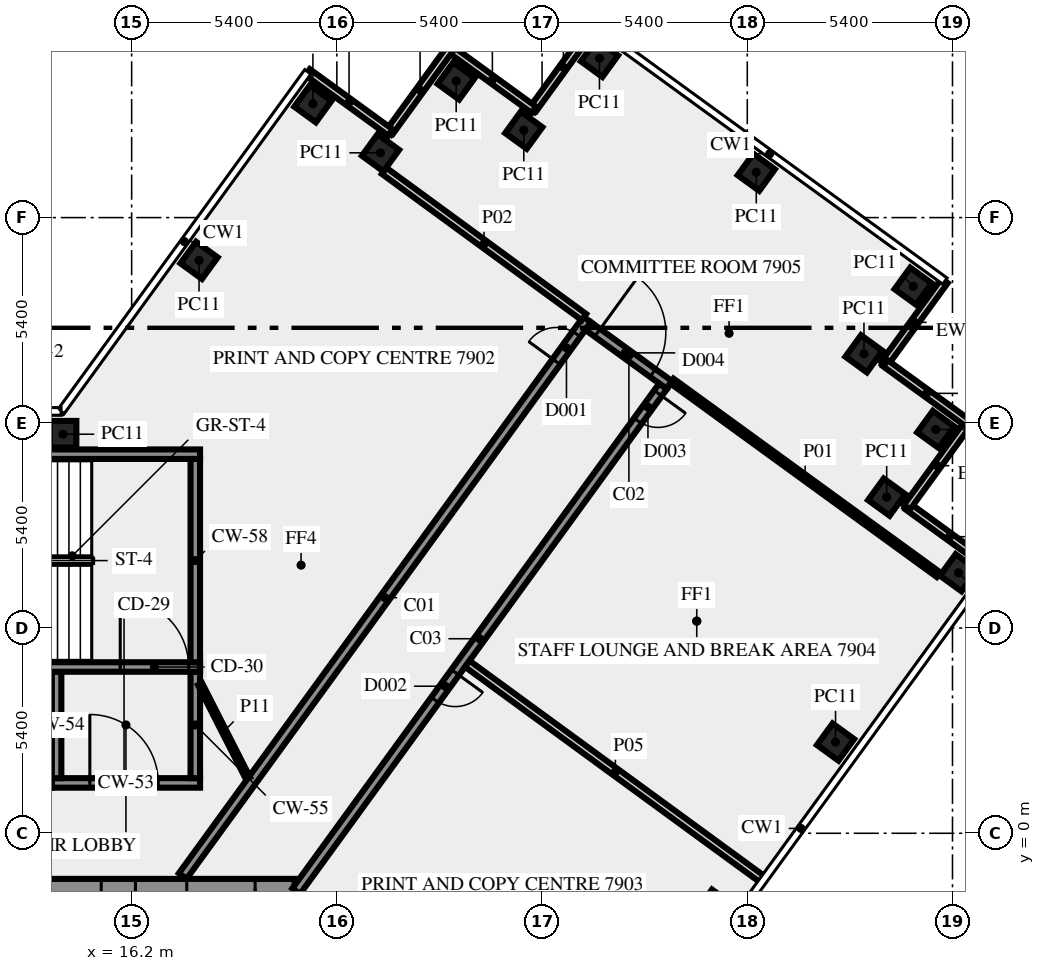
"""IFC4 building model, lengths in metres.
Left out: names, types, materials, properties, quantities, classifications, styles, units other than length and angle.
Written with IfcOpenShell. Run it as: python <this file> out.ifc"""

import sys

from ifc_helpers import new_model, si_unit, direction, frame, frame_2d, origin, origin_2d, place, context, subcontext, project, spatial, rectangle, extrude, element, fill, save


model = new_model("IFC4")
c1 = context("Model", 3, precision=1e-05, world=origin(), true_north=direction((0.0, 1.0)))
c2 = subcontext(c1, "Body", "Model", "MODEL_VIEW")
j1 = project(units=[si_unit("LENGTHUNIT", "METRE"), si_unit("PLANEANGLEUNIT", "RADIAN")], contexts=[c1])
p1 = place(None, origin())
s1 = spatial("IfcSite", under=j1, at=p1, CompositionType="ELEMENT")
p2 = place(p1, origin())
s2 = spatial("IfcBuilding", under=s1, at=p2, CompositionType="ELEMENT")
p3 = place(p2, frame((0.0, 0.0, 339.0)))
s3 = spatial("IfcBuildingStorey", under=s2, at=p3, CompositionType="ELEMENT", Elevation=339.0)
for number, where, z_axis, x_axis in (
    (1, (31.548, -1.969, 0.0), (0.0, 0.0, 1.0), (0.588, 0.809, 0.0)),
    (2, (34.722, 2.4, 0.0), (0.0, 0.0, 1.0), (0.588, 0.809, 0.0)),
    (3, (37.96, 6.855, 0.0), (0.0, 0.0, 1.0), (0.588, 0.809, 0.0)),
    (4, (36.068, 8.844, 0.0), (0.0, 0.0, 1.0), (0.588, 0.809, 0.0)),
    (5, (37.36, 10.625, 0.0), (0.0, 0.0, 1.0), (0.588, 0.809, 0.0)),
    (6, (35.471, 12.616, 0.0), (0.0, 0.0, 1.0), (-0.809, 0.588, 0.0)),
    (7, (36.765, 14.395, 0.0), (0.0, 0.0, 1.0), (-0.809, 0.588, 0.0)),
    (8, (32.637, 17.393, 0.0), (0.0, 0.0, 1.0), (-0.809, 0.588, 0.0)),
    (9, (28.51, 20.39, 0.0), (0.0, 0.0, 1.0), (-0.588, -0.809, 0.0)),
    (10, (26.519, 18.5, 0.0), (0.0, 0.0, 1.0), (-0.809, 0.588, 0.0)),
    (11, (24.74, 19.795, 0.0), (0.0, 0.0, 1.0), (-0.588, -0.809, 0.0)),
    (12, (22.749, 17.904, 0.0), (0.0, 0.0, 1.0), (-0.588, -0.809, 0.0)),
    (13, (20.97, 19.195, 0.0), (0.0, 0.0, 1.0), (-0.588, -0.809, 0.0)),
    (14, (17.974, 15.075, 0.0), (0.0, 0.0, 1.0), (-0.588, -0.809, 0.0)),
    (15, (14.395, 10.5, 0.0), (0.0, 0.0, 1.0), (-1.0, 0.0, 0.0)),
):
    element("IfcColumn", number, at=place(p3, frame(where, z_axis=z_axis, x_axis=x_axis)), inside=s3, PredefinedType="COLUMN", context=c2, shape_type="SweptSolid", body=[
        extrude(rectangle(XDim=0.7, YDim=0.7, at=origin_2d()), origin(), (0.0, 0.0, 1.0), 3.65),
    ])
p4 = place(p3, frame((36.005, 12.352, 0.0), z_axis=(0.0, 0.0, 1.0), x_axis=(0.587762999008, 0.809033161865, 0.0)))
e16 = element("IfcWall", 16, at=p4, inside=s3, PredefinedType="SOLIDWALL", context=c2, shape_type="SweptSolid", body=[
    extrude(rectangle(XDim=2.7, YDim=0.2, at=frame_2d((1.35, 0.0))), origin(), (0.0, 0.0, 1.0), 3.65),
])
for number, where, z_axis, x_axis in (
    (17, (28.354, 21.247, 0.0), (0.0, 0.0, 1.0), (-0.588, -0.809, 0.0)),
    (18, (26.785, 19.036, 0.0), (0.0, 0.0, 1.0), (-0.809, 0.588, 0.0)),
):
    element("IfcWall", number, at=place(p3, frame(where, z_axis=z_axis, x_axis=x_axis)), inside=s3, PredefinedType="SOLIDWALL", context=c2, shape_type="SweptSolid", body=[
        extrude(rectangle(XDim=2.7, YDim=0.2, at=frame_2d((1.35, 0.0))), origin(), (0.0, 0.0, 1.0), 3.65),
    ])
for number, where, z_axis, x_axis in (
    (19, (24.583, 20.65, 0.0), (0.0, 0.0, 1.0), (-0.588, -0.809, 0.0)),
    (20, (23.013, 18.438, 0.0), (0.0, 0.0, 1.0), (-0.809, 0.588, 0.0)),
    (21, (38.814, 7.01, 0.0), (0.0, 0.0, 1.0), (-0.809, 0.588, 0.0)),
    (22, (36.602, 8.58, 0.0), (0.0, 0.0, 1.0), (0.588, 0.809, 0.0)),
    (23, (38.216, 10.782, 0.0), (0.0, 0.0, 1.0), (-0.809, 0.588, 0.0)),
):
    element("IfcWall", number, at=place(p3, frame(where, z_axis=z_axis, x_axis=x_axis)), inside=s3, PredefinedType="SOLIDWALL", context=c2, shape_type="SweptSolid", body=[
        extrude(rectangle(XDim=2.7, YDim=0.2, at=frame_2d((1.35, 0.0))), origin(), (0.0, 0.0, 1.0), 3.65),
    ])
p5 = place(p3, frame((20.49, -1.45, 0.0), z_axis=(0.0, 0.0, 1.0), x_axis=(-1.0, 0.0, 0.0)))
e24 = element("IfcWall", 24, at=p5, inside=s3, PredefinedType="SHEAR", context=c2, shape_type="SweptSolid", body=[
    extrude(rectangle(XDim=40.98, YDim=0.5, at=frame_2d((20.49, 0.0))), origin(), (0.0, 0.0, 1.0), 3.65),
])
p6 = place(p5, frame((38.14, 0.0, 0.0)))
e25 = element("IfcOpeningElement", 25, at=p6, cuts=e24, PredefinedType="OPENING", context=c2, shape_type="SweptSolid", body=[
    extrude(rectangle(XDim=1.8, YDim=2.1, at=frame_2d((0.9, 1.05))), frame((0.0, 0.26, 0.0), z_axis=(0.0, -1.0, 0.0), x_axis=(1.0, 0.0, 0.0)), (0.0, 0.0, 1.0), 0.52),
])
p7 = place(p5, frame((36.728, 0.0, 0.0)))
e26 = element("IfcOpeningElement", 26, at=p7, cuts=e24, PredefinedType="OPENING", context=c2, shape_type="SweptSolid", body=[
    extrude(rectangle(XDim=0.8, YDim=2.1, at=frame_2d((0.4, 1.05))), frame((0.0, 0.26, 0.0), z_axis=(0.0, -1.0, 0.0), x_axis=(1.0, 0.0, 0.0)), (0.0, 0.0, 1.0), 0.52),
])
p8 = place(p5, frame((35.153, 0.0, 0.0)))
e27 = element("IfcOpeningElement", 27, at=p8, cuts=e24, PredefinedType="OPENING", context=c2, shape_type="SweptSolid", body=[
    extrude(rectangle(XDim=0.8, YDim=2.1, at=frame_2d((0.4, 1.05))), frame((0.0, 0.26, 0.0), z_axis=(0.0, -1.0, 0.0), x_axis=(1.0, 0.0, 0.0)), (0.0, 0.0, 1.0), 0.52),
])
p9 = place(p5, frame((32.94, 0.0, 0.0)))
e28 = element("IfcOpeningElement", 28, at=p9, cuts=e24, PredefinedType="OPENING", context=c2, shape_type="SweptSolid", body=[
    extrude(rectangle(XDim=0.9, YDim=2.1, at=frame_2d((0.45, 1.05))), frame((0.0, 0.26, 0.0), z_axis=(0.0, -1.0, 0.0), x_axis=(1.0, 0.0, 0.0)), (0.0, 0.0, 1.0), 0.52),
])
p10 = place(p5, frame((31.015, 0.0, 0.0)))
e29 = element("IfcOpeningElement", 29, at=p10, cuts=e24, PredefinedType="OPENING", context=c2, shape_type="SweptSolid", body=[
    extrude(rectangle(XDim=0.8, YDim=2.1, at=frame_2d((0.4, 1.05))), frame((0.0, 0.26, 0.0), z_axis=(0.0, -1.0, 0.0), x_axis=(1.0, 0.0, 0.0)), (0.0, 0.0, 1.0), 0.52),
])
p11 = place(p5, frame((24.765, 0.0, 0.0)))
e30 = element("IfcOpeningElement", 30, at=p11, cuts=e24, PredefinedType="OPENING", context=c2, shape_type="SweptSolid", body=[
    extrude(rectangle(XDim=0.8, YDim=2.1, at=frame_2d((0.4, 1.05))), frame((0.0, 0.26, 0.0), z_axis=(0.0, -1.0, 0.0), x_axis=(1.0, 0.0, 0.0)), (0.0, 0.0, 1.0), 0.52),
])
p12 = place(p5, frame((19.59, 0.0, 0.0)))
e31 = element("IfcOpeningElement", 31, at=p12, cuts=e24, PredefinedType="OPENING", context=c2, shape_type="SweptSolid", body=[
    extrude(rectangle(XDim=2.0, YDim=2.1, at=frame_2d((1.0, 1.05))), frame((0.0, 0.26, 0.0), z_axis=(0.0, -1.0, 0.0), x_axis=(1.0, 0.0, 0.0)), (0.0, 0.0, 1.0), 0.52),
])
p13 = place(p5, frame((15.103, 0.0, 0.0)))
e32 = element("IfcOpeningElement", 32, at=p13, cuts=e24, PredefinedType="OPENING", context=c2, shape_type="SweptSolid", body=[
    extrude(rectangle(XDim=0.9, YDim=2.1, at=frame_2d((0.45, 1.05))), frame((0.0, 0.26, 0.0), z_axis=(0.0, -1.0, 0.0), x_axis=(1.0, 0.0, 0.0)), (0.0, 0.0, 1.0), 0.52),
])
p14 = place(p5, frame((13.04, 0.0, 0.0)))
e33 = element("IfcOpeningElement", 33, at=p14, cuts=e24, PredefinedType="OPENING", context=c2, shape_type="SweptSolid", body=[
    extrude(rectangle(XDim=0.9, YDim=2.1, at=frame_2d((0.45, 1.05))), frame((0.0, 0.26, 0.0), z_axis=(0.0, -1.0, 0.0), x_axis=(1.0, 0.0, 0.0)), (0.0, 0.0, 1.0), 0.52),
])
p15 = place(p5, frame((10.177, 0.0, 0.0)))
e34 = element("IfcOpeningElement", 34, at=p15, cuts=e24, PredefinedType="OPENING", context=c2, shape_type="SweptSolid", body=[
    extrude(rectangle(XDim=0.9, YDim=2.1, at=frame_2d((0.45, 1.05))), frame((0.0, 0.26, 0.0), z_axis=(0.0, -1.0, 0.0), x_axis=(1.0, 0.0, 0.0)), (0.0, 0.0, 1.0), 0.52),
])
p16 = place(p5, frame((7.14, 0.0, 0.0)))
e35 = element("IfcOpeningElement", 35, at=p16, cuts=e24, PredefinedType="OPENING", context=c2, shape_type="SweptSolid", body=[
    extrude(rectangle(XDim=0.9, YDim=2.1, at=frame_2d((0.45, 1.05))), frame((0.0, 0.26, 0.0), z_axis=(0.0, -1.0, 0.0), x_axis=(1.0, 0.0, 0.0)), (0.0, 0.0, 1.0), 0.52),
])
p17 = place(p5, frame((4.19, 0.0, 0.0)))
e36 = element("IfcOpeningElement", 36, at=p17, cuts=e24, PredefinedType="OPENING", context=c2, shape_type="SweptSolid", body=[
    extrude(rectangle(XDim=0.9, YDim=2.1, at=frame_2d((0.45, 1.05))), frame((0.0, 0.26, 0.0), z_axis=(0.0, -1.0, 0.0), x_axis=(1.0, 0.0, 0.0)), (0.0, 0.0, 1.0), 0.52),
])
p18 = place(p5, frame((1.04, 0.0, 0.0)))
e37 = element("IfcOpeningElement", 37, at=p18, cuts=e24, PredefinedType="OPENING", context=c2, shape_type="SweptSolid", body=[
    extrude(rectangle(XDim=1.8, YDim=2.1, at=frame_2d((0.9, 1.05))), frame((0.0, 0.26, 0.0), z_axis=(0.0, -1.0, 0.0), x_axis=(1.0, 0.0, 0.0)), (0.0, 0.0, 1.0), 0.52),
])
p19 = place(p3, frame((14.1, 1.325, 0.0), z_axis=(0.0, 0.0, 1.0), x_axis=(1.0, 0.0, 0.0)))
e38 = element("IfcWall", 38, at=p19, inside=s3, PredefinedType="SHEAR", context=c2, shape_type="SweptSolid", body=[
    extrude(rectangle(XDim=3.9, YDim=0.25, at=frame_2d((1.95, 0.0))), origin(), (0.0, 0.0, 1.0), 3.65),
])
p20 = place(p19, frame((1.0, 0.0, 0.0)))
e39 = element("IfcOpeningElement", 39, at=p20, cuts=e38, PredefinedType="OPENING", context=c2, shape_type="SweptSolid", body=[
    extrude(rectangle(XDim=1.8, YDim=2.1, at=frame_2d((0.9, 1.05))), frame((0.0, 0.135, 0.0), z_axis=(0.0, -1.0, 0.0), x_axis=(1.0, 0.0, 0.0)), (0.0, 0.0, 1.0), 0.27),
])
for number, where, z_axis, x_axis in (
    (40, (14.225, 1.45, 0.0), (0.0, 0.0, 1.0), (0.0, 1.0, 0.0)),
    (41, (17.875, 1.45, 0.0), (0.0, 0.0, 1.0), (0.0, 1.0, 0.0)),
):
    element("IfcWall", number, at=place(p3, frame(where, z_axis=z_axis, x_axis=x_axis)), inside=s3, PredefinedType="SHEAR", context=c2, shape_type="SweptSolid", body=[
        extrude(rectangle(XDim=2.8, YDim=0.25, at=frame_2d((1.4, 0.0))), origin(), (0.0, 0.0, 1.0), 3.65),
    ])
p21 = place(p3, frame((7.5, 4.375, 0.0), z_axis=(0.0, 0.0, 1.0), x_axis=(1.0, 0.0, 0.0)))
e42 = element("IfcWall", 42, at=p21, inside=s3, PredefinedType="SHEAR", context=c2, shape_type="SweptSolid", body=[
    extrude(rectangle(XDim=10.5, YDim=0.25, at=frame_2d((5.25, 0.0))), origin(), (0.0, 0.0, 1.0), 3.65),
])
p22 = place(p21, frame((8.4, 0.0, 0.0)))
e43 = element("IfcOpeningElement", 43, at=p22, cuts=e42, PredefinedType="OPENING", context=c2, shape_type="SweptSolid", body=[
    extrude(rectangle(XDim=1.8, YDim=2.1, at=frame_2d((0.9, 1.05))), frame((0.0, 0.135, 0.0), z_axis=(0.0, -1.0, 0.0), x_axis=(1.0, 0.0, 0.0)), (0.0, 0.0, 1.0), 0.27),
])
p23 = place(p3, frame((17.875, 4.5, 0.0), z_axis=(0.0, 0.0, 1.0), x_axis=(0.0, 1.0, 0.0)))
e44 = element("IfcWall", 44, at=p23, inside=s3, PredefinedType="SHEAR", context=c2, shape_type="SweptSolid", body=[
    extrude(rectangle(XDim=5.35, YDim=0.25, at=frame_2d((2.675, 0.0))), origin(), (0.0, 0.0, 1.0), 3.65),
])
p24 = place(p3, frame((7.5, 9.975, 0.0), z_axis=(0.0, 0.0, 1.0), x_axis=(1.0, 0.0, 0.0)))
e45 = element("IfcWall", 45, at=p24, inside=s3, PredefinedType="SHEAR", context=c2, shape_type="SweptSolid", body=[
    extrude(rectangle(XDim=10.5, YDim=0.25, at=frame_2d((5.25, 0.0))), origin(), (0.0, 0.0, 1.0), 3.65),
])
p25 = place(p24, frame((2.0, 0.0, 1.0)))
e46 = element("IfcOpeningElement", 46, at=p25, cuts=e45, PredefinedType="OPENING", context=c2, shape_type="SweptSolid", body=[
    extrude(rectangle(XDim=1.2, YDim=1.2, at=frame_2d((0.6, 0.6))), frame((0.0, 0.135, 0.0), z_axis=(0.0, -1.0, 0.0), x_axis=(1.0, 0.0, 0.0)), (0.0, 0.0, 1.0), 0.27),
])
p26 = place(p3, frame((17.545, -1.125, 0.0), z_axis=(0.0, 0.0, 1.0), x_axis=(0.58779555165, 0.809009511354, 0.0)))
e47 = element("IfcWall", 47, at=p26, inside=s3, PredefinedType="SOLIDWALL", context=c2, shape_type="SweptSolid", body=[
    extrude(rectangle(XDim=18.103, YDim=0.25, at=frame_2d((9.052, 0.0))), origin(), (0.0, 0.0, 1.0), 3.65),
])
p27 = place(p26, frame((16.728, 0.0, 0.0)))
e48 = element("IfcOpeningElement", 48, at=p27, cuts=e47, PredefinedType="OPENING", context=c2, shape_type="SweptSolid", body=[
    extrude(rectangle(XDim=0.9, YDim=2.1, at=frame_2d((0.45, 1.05))), frame((0.0, 0.135, 0.0), z_axis=(0.0, -1.0, 0.0), x_axis=(1.0, 0.0, 0.0)), (0.0, 0.0, 1.0), 0.27),
])
p28 = place(p3, frame((28.213, 13.346, 0.0), z_axis=(0.0, 0.0, 1.0), x_axis=(0.809006914995, -0.587799125119, 0.0)))
e49 = element("IfcWall", 49, at=p28, inside=s3, PredefinedType="SOLIDWALL", context=c2, shape_type="SweptSolid", body=[
    extrude(rectangle(XDim=2.65, YDim=0.25, at=frame_2d((1.325, 0.0))), origin(), (0.0, 0.0, 1.0), 3.65),
])
p29 = place(p28, frame((0.3, 0.0, 0.0)))
e50 = element("IfcOpeningElement", 50, at=p29, cuts=e49, PredefinedType="OPENING", context=c2, shape_type="SweptSolid", body=[
    extrude(rectangle(XDim=1.8, YDim=2.1, at=frame_2d((0.9, 1.05))), frame((0.0, 0.135, 0.0), z_axis=(0.0, -1.0, 0.0), x_axis=(1.0, 0.0, 0.0)), (0.0, 0.0, 1.0), 0.27),
])
p30 = place(p3, frame((30.183, 11.761, 0.0), z_axis=(0.0, 0.0, 1.0), x_axis=(-0.587781762867, -0.80901952958, 0.0)))
e51 = element("IfcWall", 51, at=p30, inside=s3, PredefinedType="SOLIDWALL", context=c2, shape_type="SweptSolid", body=[
    extrude(rectangle(XDim=16.42, YDim=0.25, at=frame_2d((8.21, 0.0))), origin(), (0.0, 0.0, 1.0), 3.65),
])
p31 = place(p30, frame((0.225, 0.0, 0.0)))
e52 = element("IfcOpeningElement", 52, at=p31, cuts=e51, PredefinedType="OPENING", context=c2, shape_type="SweptSolid", body=[
    extrude(rectangle(XDim=0.9, YDim=2.1, at=frame_2d((0.45, 1.05))), frame((0.0, 0.135, 0.0), z_axis=(0.0, -1.0, 0.0), x_axis=(1.0, 0.0, 0.0)), (0.0, 0.0, 1.0), 0.27),
])
p32 = place(p30, frame((9.304, 0.0, 0.0)))
e53 = element("IfcOpeningElement", 53, at=p32, cuts=e51, PredefinedType="OPENING", context=c2, shape_type="SweptSolid", body=[
    extrude(rectangle(XDim=0.9, YDim=2.1, at=frame_2d((0.45, 1.05))), frame((0.0, 0.135, 0.0), z_axis=(0.0, -1.0, 0.0), x_axis=(1.0, 0.0, 0.0)), (0.0, 0.0, 1.0), 0.27),
])
p33 = place(p3, frame((30.415, 11.902, 0.0), z_axis=(0.0, 0.0, 1.0), x_axis=(0.809020922653, -0.587779845444, 0.0)))
e54 = element("IfcWall", 54, at=p33, inside=s3, PredefinedType="PARTITIONING", context=c2, shape_type="SweptSolid", body=[
    extrude(rectangle(XDim=8.67, YDim=0.15, at=frame_2d((4.335, 0.0))), origin(), (0.0, 0.0, 1.0), 3.65),
])
p34 = place(p3, frame((22.844, 17.43, 0.0), z_axis=(0.0, 0.0, 1.0), x_axis=(0.80699548015, -0.590557613631, 0.0)))
e55 = element("IfcWall", 55, at=p34, inside=s3, PredefinedType="SOLIDWALL", context=c2, shape_type="SweptSolid", body=[
    extrude(rectangle(XDim=6.515, YDim=0.2, at=frame_2d((3.258, 0.0))), origin(), (0.0, 0.0, 1.0), 3.65),
])
p35 = place(p3, frame((25.032, 4.459, 0.0), z_axis=(0.0, 0.0, 1.0), x_axis=(0.807602415854, -0.589727342004, 0.0)))
e56 = element("IfcWall", 56, at=p35, inside=s3, PredefinedType="SOLIDWALL", context=c2, shape_type="SweptSolid", body=[
    extrude(rectangle(XDim=9.651, YDim=0.2, at=frame_2d((4.826, 0.0))), origin(), (0.0, 0.0, 1.0), 2.95),
])
p36 = place(p3, frame((18.0, 3.925, 0.0), z_axis=(0.0, 0.0, 1.0), x_axis=(0.453950796792, -0.891026752736, 0.0)))
e57 = element("IfcWall", 57, at=p36, inside=s3, PredefinedType="PARTITIONING", context=c2, shape_type="SweptSolid", body=[
    extrude(rectangle(XDim=2.778, YDim=0.12, at=frame_2d((1.389, 0.0))), origin(), (0.0, 0.0, 1.0), 3.65),
])
p37 = place(p17, origin())
e58 = element("IfcDoor", 58, at=p37, inside=s3, OperationType="SINGLE_SWING_LEFT", PredefinedType="DOOR", context=c2, shape_type="SweptSolid", body=[
    extrude(rectangle(XDim=0.9, YDim=2.1, at=frame_2d((0.45, 1.05))), frame((0.0, 0.025, 0.0), z_axis=(0.0, -1.0, 0.0), x_axis=(1.0, 0.0, 0.0)), (0.0, 0.0, 1.0), 0.05),
])
fill(e36, e58)
p38 = place(p18, origin())
e59 = element("IfcDoor", 59, at=p38, inside=s3, OperationType="DOUBLE_DOOR_SINGLE_SWING", PredefinedType="DOOR", context=c2, shape_type="SweptSolid", body=[
    extrude(rectangle(XDim=1.8, YDim=2.1, at=frame_2d((0.9, 1.05))), frame((0.0, 0.025, 0.0), z_axis=(0.0, -1.0, 0.0), x_axis=(1.0, 0.0, 0.0)), (0.0, 0.0, 1.0), 0.05),
])
fill(e37, e59)
p39 = place(p20, origin())
e60 = element("IfcDoor", 60, at=p39, inside=s3, OperationType="DOUBLE_DOOR_SINGLE_SWING", PredefinedType="DOOR", context=c2, shape_type="SweptSolid", body=[
    extrude(rectangle(XDim=1.8, YDim=2.1, at=frame_2d((0.9, 1.05))), frame((0.0, 0.025, 0.0), z_axis=(0.0, -1.0, 0.0), x_axis=(1.0, 0.0, 0.0)), (0.0, 0.0, 1.0), 0.05),
])
fill(e39, e60)
p40 = place(p22, origin())
e61 = element("IfcDoor", 61, at=p40, inside=s3, OperationType="DOUBLE_DOOR_SINGLE_SWING", PredefinedType="DOOR", context=c2, shape_type="SweptSolid", body=[
    extrude(rectangle(XDim=1.8, YDim=2.1, at=frame_2d((0.9, 1.05))), frame((0.0, 0.025, 0.0), z_axis=(0.0, -1.0, 0.0), x_axis=(1.0, 0.0, 0.0)), (0.0, 0.0, 1.0), 0.05),
])
fill(e43, e61)
p41 = place(p29, origin())
e62 = element("IfcDoor", 62, at=p41, inside=s3, OperationType="DOUBLE_DOOR_SINGLE_SWING", PredefinedType="DOOR", context=c2, shape_type="SweptSolid", body=[
    extrude(rectangle(XDim=1.8, YDim=2.1, at=frame_2d((0.9, 1.05))), frame((0.0, 0.025, 0.0), z_axis=(0.0, -1.0, 0.0), x_axis=(1.0, 0.0, 0.0)), (0.0, 0.0, 1.0), 0.05),
])
fill(e50, e62)
p42 = place(p31, origin())
e63 = element("IfcDoor", 63, at=p42, inside=s3, OperationType="SINGLE_SWING_LEFT", PredefinedType="DOOR", context=c2, shape_type="SweptSolid", body=[
    extrude(rectangle(XDim=0.9, YDim=2.1, at=frame_2d((0.45, 1.05))), frame((0.0, 0.025, 0.0), z_axis=(0.0, -1.0, 0.0), x_axis=(1.0, 0.0, 0.0)), (0.0, 0.0, 1.0), 0.05),
])
fill(e52, e63)
p43 = place(p27, origin())
e64 = element("IfcDoor", 64, at=p43, inside=s3, OperationType="SINGLE_SWING_RIGHT", PredefinedType="DOOR", context=c2, shape_type="SweptSolid", body=[
    extrude(rectangle(XDim=0.9, YDim=2.1, at=frame_2d((0.45, 1.05))), frame((0.0, 0.025, 0.0), z_axis=(0.0, -1.0, 0.0), x_axis=(1.0, 0.0, 0.0)), (0.0, 0.0, 1.0), 0.05),
])
fill(e48, e64)
p44 = place(p32, origin())
e65 = element("IfcDoor", 65, at=p44, inside=s3, OperationType="SINGLE_SWING_LEFT", PredefinedType="DOOR", context=c2, shape_type="SweptSolid", body=[
    extrude(rectangle(XDim=0.9, YDim=2.1, at=frame_2d((0.45, 1.05))), frame((0.0, 0.025, 0.0), z_axis=(0.0, -1.0, 0.0), x_axis=(1.0, 0.0, 0.0)), (0.0, 0.0, 1.0), 0.05),
])
fill(e53, e65)
save(model, sys.argv[1])
